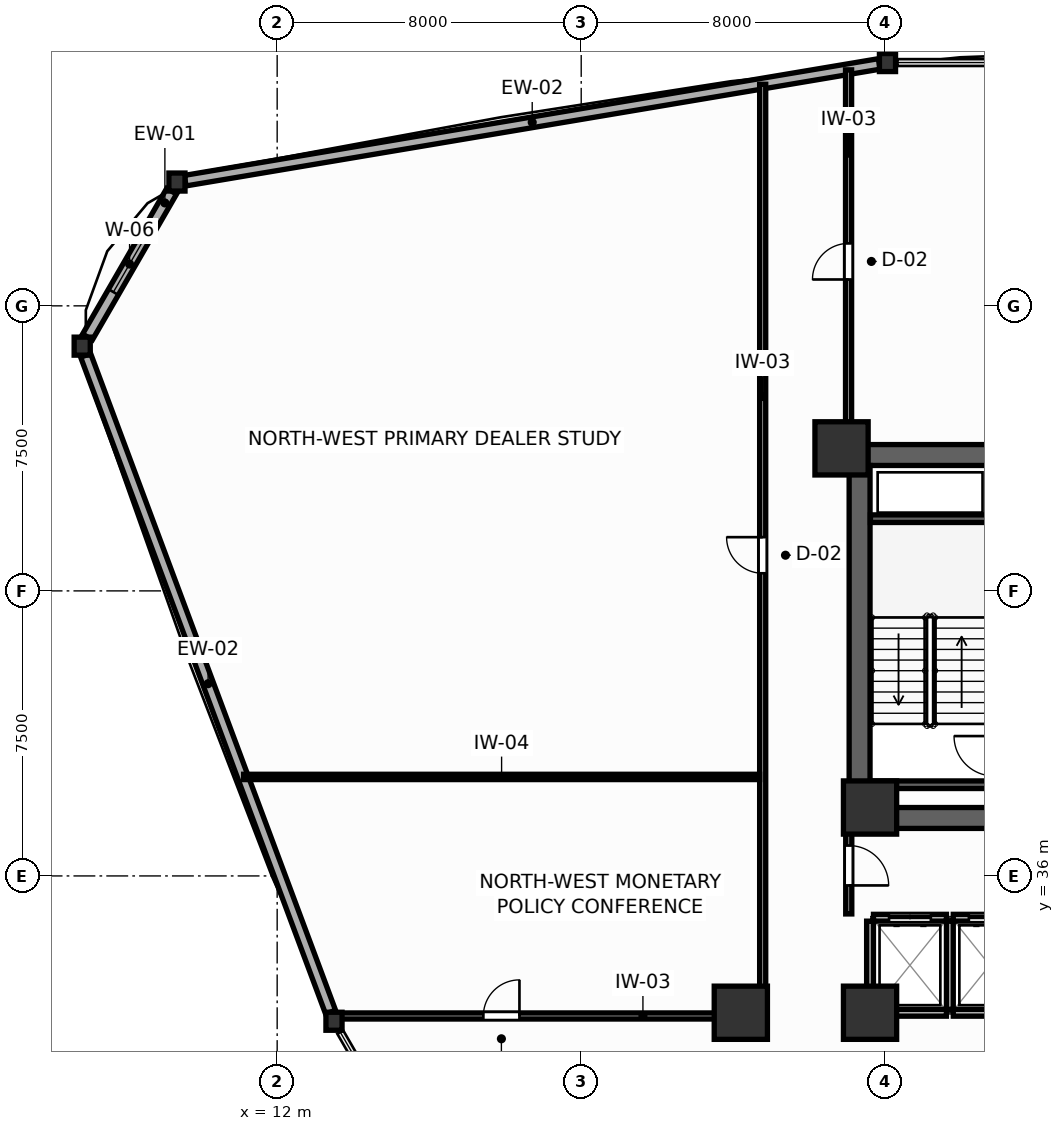
"""IFC4 building model, lengths in metres.
Left out: names, types, materials, properties, quantities, classifications, styles, units other than length and angle.
Written with IfcOpenShell. Run it as: python <this file> out.ifc"""

import sys

from ifc_helpers import new_model, si_unit, direction, frame, frame_2d, origin, origin_2d, place, context, subcontext, project, spatial, rectangle, i_section, extrude, source, transform, mapped, element, fill, save


model = new_model("IFC4")
c1 = context("Model", 3, precision=1e-05, world=origin(), true_north=direction((0.0, 1.0)))
c2 = subcontext(c1, "Body", "Model", "MODEL_VIEW")
j1 = project(units=[si_unit("LENGTHUNIT", "METRE"), si_unit("PLANEANGLEUNIT", "RADIAN")], contexts=[c1])
p1 = place(None, origin())
s1 = spatial("IfcSite", under=j1, at=p1, CompositionType="ELEMENT")
p2 = place(p1, origin())
s2 = spatial("IfcBuilding", under=s1, at=p2, CompositionType="ELEMENT")
p3 = place(p2, frame((0.0, 0.0, 35.7)))
s3 = spatial("IfcBuildingStorey", under=s2, at=p3, CompositionType="ELEMENT", Elevation=35.7)
p4 = place(p3, frame((27.05, 47.075, 0.0), z_axis=(0.0, 0.0, 1.0), x_axis=(1.0, 0.0, 0.0)))
e1 = element("IfcWall", 1, at=p4, inside=s3, PredefinedType="SHEAR", context=c2, shape_type="SweptSolid", body=[
    extrude(rectangle(XDim=17.9, YDim=0.55, at=frame_2d((8.95, 0.0))), origin(), (0.0, 0.0, 1.0), 3.9),
])
p5 = place(p3, frame((27.05, 37.525, 0.0), z_axis=(0.0, 0.0, 1.0), x_axis=(1.0, 0.0, 0.0)))
e2 = element("IfcWall", 2, at=p5, inside=s3, PredefinedType="SHEAR", context=c2, shape_type="SweptSolid", body=[
    extrude(rectangle(XDim=17.9, YDim=0.55, at=frame_2d((8.95, 0.0))), origin(), (0.0, 0.0, 1.0), 3.9),
])
p6 = place(p5, frame((4.975, 0.0, 0.0)))
e3 = element("IfcOpeningElement", 3, at=p6, cuts=e2, PredefinedType="OPENING", context=c2, shape_type="SweptSolid", body=[
    extrude(rectangle(XDim=1.05, YDim=2.1, at=frame_2d((0.525, 1.05))), frame((0.0, 0.285, 0.0), z_axis=(0.0, -1.0, 0.0), x_axis=(1.0, 0.0, 0.0)), (0.0, 0.0, 1.0), 0.57),
])
p7 = place(p5, frame((11.875, 0.0, 0.0)))
e4 = element("IfcOpeningElement", 4, at=p7, cuts=e2, PredefinedType="OPENING", context=c2, shape_type="SweptSolid", body=[
    extrude(rectangle(XDim=1.05, YDim=2.1, at=frame_2d((0.525, 1.05))), frame((0.0, 0.285, 0.0), z_axis=(0.0, -1.0, 0.0), x_axis=(1.0, 0.0, 0.0)), (0.0, 0.0, 1.0), 0.57),
])
p8 = place(p3, frame((27.325, 37.8, 0.0), z_axis=(0.0, 0.0, 1.0), x_axis=(0.0, 1.0, 0.0)))
e5 = element("IfcWall", 5, at=p8, inside=s3, PredefinedType="SHEAR", context=c2, shape_type="SweptSolid", body=[
    extrude(rectangle(XDim=9.0, YDim=0.55, at=frame_2d((4.5, 0.0))), origin(), (0.0, 0.0, 1.0), 3.9),
])
m1 = source(origin(), c2, "Body", "SweptSolid", [
    extrude(rectangle(XDim=1.4, YDim=1.4, at=origin_2d()), origin(), (0.0, 0.0, 1.0), 3.9),
])
for number, where, z_axis, x_axis in (
    (6, (26.85, 47.25, 0.0), (0.0, 0.0, 1.0), (1.0, 0.0, 0.0)),
    (7, (27.6, 37.8, 0.0), (0.0, 0.0, 1.0), (1.0, 0.0, 0.0)),
    (8, (27.6, 32.4, 0.0), (0.0, 0.0, 1.0), (1.0, 0.0, 0.0)),
    (9, (24.2, 32.4, 0.0), (0.0, 0.0, 1.0), (1.0, 0.0, 0.0)),
):
    element("IfcColumn", number, at=place(p3, frame(where, z_axis=z_axis, x_axis=x_axis)), inside=s3, PredefinedType="COLUMN", context=c2, shape_type="MappedRepresentation", body=[
        mapped(m1, transform((0.0, 0.0, 0.0), scale=1.0)),
    ])
m2 = source(origin(), c2, "Body", "SweptSolid", [
    extrude(i_section(OverallWidth=0.424, OverallDepth=0.474, WebThickness=0.045, FlangeThickness=0.072, FilletRadius=0.015, at=origin_2d()), origin(), (0.0, 0.0, 1.0), 3.9),
])
for number, where, z_axis, x_axis in (
    (10, (28.059, 57.402, 0.0), (0.0, 0.0, 1.0), (1.0, 0.0, 0.0)),
    (11, (9.363, 54.257, 0.0), (0.0, 0.0, 1.0), (1.0, 0.0, 0.0)),
    (12, (6.87, 49.94, 0.0), (0.0, 0.0, 1.0), (1.0, 0.0, 0.0)),
    (13, (13.495, 32.177, 0.0), (0.0, 0.0, 1.0), (1.0, 0.0, 0.0)),
):
    element("IfcColumn", number, at=place(p3, frame(where, z_axis=z_axis, x_axis=x_axis)), inside=s3, PredefinedType="COLUMN", context=c2, shape_type="MappedRepresentation", body=[
        mapped(m2, transform((0.0, 0.0, 0.0), scale=1.0)),
    ])
p9 = place(p3, frame((27.842, 57.365, 0.0), z_axis=(0.0, 0.0, 1.0), x_axis=(-0.986153073874, -0.165837616025, 0.0)))
e14 = element("IfcWall", 14, at=p9, inside=s3, PredefinedType="SOLIDWALL", context=c2, shape_type="SweptSolid", body=[
    extrude(rectangle(XDim=18.518, YDim=0.28, at=frame_2d((9.259, 0.0))), origin(), (0.0, 0.0, 1.0), 2.08),
])
p10 = place(p3, frame((9.223, 54.015, 0.0), z_axis=(0.0, 0.0, 1.0), x_axis=(-0.499994569991, -0.866028538779, 0.0)))
e15 = element("IfcWall", 15, at=p10, inside=s3, PredefinedType="SOLIDWALL", context=c2, shape_type="SweptSolid", body=[
    extrude(rectangle(XDim=4.427, YDim=0.3, at=frame_2d((2.213, 0.0))), origin(), (0.0, 0.0, 1.0), 2.08),
])
p11 = place(p10, frame((1.363, 0.0, 0.75)))
e16 = element("IfcOpeningElement", 16, at=p11, cuts=e15, PredefinedType="OPENING", context=c2, shape_type="SweptSolid", body=[
    extrude(rectangle(XDim=1.7, YDim=1.15, at=frame_2d((0.85, 0.575))), frame((0.0, 0.16, 0.0), z_axis=(0.0, -1.0, 0.0), x_axis=(1.0, 0.0, 0.0)), (0.0, 0.0, 1.0), 0.32),
])
p12 = place(p3, frame((6.96, 49.698, 0.0), z_axis=(0.0, 0.0, 1.0), x_axis=(0.349439969545, -0.936958754527, 0.0)))
e17 = element("IfcWall", 17, at=p12, inside=s3, PredefinedType="SOLIDWALL", context=c2, shape_type="SweptSolid", body=[
    extrude(rectangle(XDim=18.442, YDim=0.28, at=frame_2d((9.221, 0.0))), origin(), (0.0, 0.0, 1.0), 2.08),
])
for number, where, z_axis, x_axis in (
    (18, (27.61, 45.4, 0.0), (0.0, 0.0, 1.0), (1.0, 0.0, 0.0)),
    (19, (27.61, 38.4, 0.0), (0.0, 0.0, 1.0), (1.0, 0.0, 0.0)),
):
    element("IfcWall", number, at=place(p3, frame(where, z_axis=z_axis, x_axis=x_axis)), inside=s3, PredefinedType="SHEAR", context=c2, shape_type="SweptSolid", body=[
        extrude(rectangle(XDim=3.14, YDim=0.2, at=frame_2d((1.57, 0.0))), origin(), (0.0, 0.0, 1.0), 3.9),
    ])
p13 = place(p3, frame((27.69, 34.9, 0.0), z_axis=(0.0, 0.0, 1.0), x_axis=(1.0, 0.0, 0.0)))
e20 = element("IfcWall", 20, at=p13, inside=s3, PredefinedType="PARTITIONING", context=c2, shape_type="SweptSolid", body=[
    extrude(rectangle(XDim=1.92, YDim=0.18, at=frame_2d((0.96, 0.0))), origin(), (0.0, 0.0, 1.0), 3.68),
])
p14 = place(p13, frame((0.41, 0.0, 0.0)))
e21 = element("IfcOpeningElement", 21, at=p14, cuts=e20, PredefinedType="OPENING", context=c2, shape_type="SweptSolid", body=[
    extrude(rectangle(XDim=1.1, YDim=2.1, at=frame_2d((0.55, 1.05))), frame((0.0, 0.1, 0.0), z_axis=(0.0, -1.0, 0.0), x_axis=(1.0, 0.0, 0.0)), (0.0, 0.0, 1.0), 0.2),
])
p15 = place(p3, frame((27.69, 32.4, 0.0), z_axis=(0.0, 0.0, 1.0), x_axis=(1.0, 0.0, 0.0)))
e22 = element("IfcWall", 22, at=p15, inside=s3, PredefinedType="PARTITIONING", context=c2, shape_type="SweptSolid", body=[
    extrude(rectangle(XDim=1.92, YDim=0.18, at=frame_2d((0.96, 0.0))), origin(), (0.0, 0.0, 1.0), 2.24),
])
p16 = place(p3, frame((27.6, 32.49, 0.0), z_axis=(0.0, 0.0, 1.0), x_axis=(0.0, 1.0, 0.0)))
e23 = element("IfcWall", 23, at=p16, inside=s3, PredefinedType="PARTITIONING", context=c2, shape_type="SweptSolid", body=[
    extrude(rectangle(XDim=2.32, YDim=0.18, at=frame_2d((1.16, 0.0))), origin(), (0.0, 0.0, 1.0), 3.68),
])
p17 = place(p3, frame((29.79, 34.9, 0.0), z_axis=(0.0, 0.0, 1.0), x_axis=(1.0, 0.0, 0.0)))
e24 = element("IfcWall", 24, at=p17, inside=s3, PredefinedType="PARTITIONING", context=c2, shape_type="SweptSolid", body=[
    extrude(rectangle(XDim=1.92, YDim=0.18, at=frame_2d((0.96, 0.0))), origin(), (0.0, 0.0, 1.0), 3.68),
])
p18 = place(p17, frame((0.41, 0.0, 0.0)))
e25 = element("IfcOpeningElement", 25, at=p18, cuts=e24, PredefinedType="OPENING", context=c2, shape_type="SweptSolid", body=[
    extrude(rectangle(XDim=1.1, YDim=2.1, at=frame_2d((0.55, 1.05))), frame((0.0, 0.1, 0.0), z_axis=(0.0, -1.0, 0.0), x_axis=(1.0, 0.0, 0.0)), (0.0, 0.0, 1.0), 0.2),
])
p19 = place(p3, frame((29.79, 32.4, 0.0), z_axis=(0.0, 0.0, 1.0), x_axis=(1.0, 0.0, 0.0)))
e26 = element("IfcWall", 26, at=p19, inside=s3, PredefinedType="PARTITIONING", context=c2, shape_type="SweptSolid", body=[
    extrude(rectangle(XDim=1.92, YDim=0.18, at=frame_2d((0.96, 0.0))), origin(), (0.0, 0.0, 1.0), 2.24),
])
p20 = place(p3, frame((29.7, 32.49, 0.0), z_axis=(0.0, 0.0, 1.0), x_axis=(0.0, 1.0, 0.0)))
e27 = element("IfcWall", 27, at=p20, inside=s3, PredefinedType="PARTITIONING", context=c2, shape_type="SweptSolid", body=[
    extrude(rectangle(XDim=2.32, YDim=0.18, at=frame_2d((1.16, 0.0))), origin(), (0.0, 0.0, 1.0), 3.68),
])
p21 = place(p3, frame((27.04, 35.0, 0.0), z_axis=(0.0, 0.0, 1.0), x_axis=(0.0, 1.0, 0.0)))
e28 = element("IfcWall", 28, at=p21, inside=s3, PredefinedType="PARTITIONING", context=c2, shape_type="SweptSolid", body=[
    extrude(rectangle(XDim=2.65, YDim=0.16, at=frame_2d((1.325, 0.0))), origin(), (0.0, 0.0, 1.0), 3.68),
])
p22 = place(p21, frame((0.75, 0.0, 0.0)))
e29 = element("IfcOpeningElement", 29, at=p22, cuts=e28, PredefinedType="OPENING", context=c2, shape_type="SweptSolid", body=[
    extrude(rectangle(XDim=1.05, YDim=2.1, at=frame_2d((0.525, 1.05))), frame((0.0, 0.09, 0.0), z_axis=(0.0, -1.0, 0.0), x_axis=(1.0, 0.0, 0.0)), (0.0, 0.0, 1.0), 0.18),
])
p23 = place(p3, frame((24.775, 32.31, 0.0), z_axis=(0.0, 0.0, 1.0), x_axis=(0.0, 1.0, 0.0)))
e30 = element("IfcWall", 30, at=p23, inside=s3, PredefinedType="PARTITIONING", context=c2, shape_type="SweptSolid", body=[
    extrude(rectangle(XDim=24.519, YDim=0.16, at=frame_2d((12.26, 0.0))), origin(), (0.0, 0.0, 1.0), 3.68),
])
p24 = place(p23, frame((11.654, 0.0, 0.0)))
e31 = element("IfcOpeningElement", 31, at=p24, cuts=e30, PredefinedType="OPENING", context=c2, shape_type="SweptSolid", body=[
    extrude(rectangle(XDim=0.95, YDim=2.05, at=frame_2d((0.475, 1.025))), frame((0.0, 0.09, 0.0), z_axis=(0.0, -1.0, 0.0), x_axis=(1.0, 0.0, 0.0)), (0.0, 0.0, 1.0), 0.18),
])
p25 = place(p3, frame((13.463, 32.315, 0.0), z_axis=(0.0, 0.0, 1.0), x_axis=(1.0, 0.0, 0.0)))
e32 = element("IfcWall", 32, at=p25, inside=s3, PredefinedType="PARTITIONING", context=c2, shape_type="SweptSolid", body=[
    extrude(rectangle(XDim=11.23, YDim=0.16, at=frame_2d((5.615, 0.0))), origin(), (0.0, 0.0, 1.0), 2.24),
])
p26 = place(p25, frame((3.962, 0.0, 0.0)))
e33 = element("IfcOpeningElement", 33, at=p26, cuts=e32, PredefinedType="OPENING", context=c2, shape_type="SweptSolid", body=[
    extrude(rectangle(XDim=0.95, YDim=2.05, at=frame_2d((0.475, 1.025))), frame((0.0, 0.09, 0.0), z_axis=(0.0, -1.0, 0.0), x_axis=(1.0, 0.0, 0.0)), (0.0, 0.0, 1.0), 0.18),
])
p27 = place(p3, frame((27.035, 47.34, 0.0), z_axis=(0.0, 0.0, 1.0), x_axis=(0.0, 1.0, 0.0)))
e34 = element("IfcWall", 34, at=p27, inside=s3, PredefinedType="PARTITIONING", context=c2, shape_type="SweptSolid", body=[
    extrude(rectangle(XDim=9.869, YDim=0.16, at=frame_2d((4.935, 0.0))), origin(), (0.0, 0.0, 1.0), 2.24),
])
p28 = place(p27, frame((4.354, 0.0, 0.0)))
e35 = element("IfcOpeningElement", 35, at=p28, cuts=e34, PredefinedType="OPENING", context=c2, shape_type="SweptSolid", body=[
    extrude(rectangle(XDim=0.95, YDim=2.05, at=frame_2d((0.475, 1.025))), frame((0.0, 0.09, 0.0), z_axis=(0.0, -1.0, 0.0), x_axis=(1.0, 0.0, 0.0)), (0.0, 0.0, 1.0), 0.18),
])
p29 = place(p3, frame((11.118, 38.605, 0.0), z_axis=(0.0, 0.0, 1.0), x_axis=(1.0, 0.0, 0.0)))
e36 = element("IfcWall", 36, at=p29, inside=s3, PredefinedType="PARTITIONING", context=c2, shape_type="SweptSolid", body=[
    extrude(rectangle(XDim=13.575, YDim=0.14, at=frame_2d((6.788, 0.0))), origin(), (0.0, 0.0, 1.0), 3.68),
])
p30 = place(p11, origin())
e37 = element("IfcWindow", 37, at=p30, inside=s3, PartitioningType="SINGLE_PANEL", PredefinedType="WINDOW", context=c2, shape_type="SweptSolid", body=[
    extrude(rectangle(XDim=1.7, YDim=1.15, at=frame_2d((0.85, 0.575))), frame((0.0, 0.03, 0.0), z_axis=(0.0, -1.0, 0.0), x_axis=(1.0, 0.0, 0.0)), (0.0, 0.0, 1.0), 0.06),
])
fill(e16, e37)
p31 = place(p14, origin())
e38 = element("IfcDoor", 38, at=p31, inside=s3, OperationType="DOUBLE_DOOR_SLIDING", PredefinedType="DOOR", context=c2, shape_type="SweptSolid", body=[
    extrude(rectangle(XDim=1.1, YDim=2.1, at=frame_2d((0.55, 1.05))), frame((0.0, 0.025, 0.0), z_axis=(0.0, -1.0, 0.0), x_axis=(1.0, 0.0, 0.0)), (0.0, 0.0, 1.0), 0.05),
])
fill(e21, e38)
p32 = place(p18, origin())
e39 = element("IfcDoor", 39, at=p32, inside=s3, OperationType="DOUBLE_DOOR_SLIDING", PredefinedType="DOOR", context=c2, shape_type="SweptSolid", body=[
    extrude(rectangle(XDim=1.1, YDim=2.1, at=frame_2d((0.55, 1.05))), frame((0.0, 0.025, 0.0), z_axis=(0.0, -1.0, 0.0), x_axis=(1.0, 0.0, 0.0)), (0.0, 0.0, 1.0), 0.05),
])
fill(e25, e39)
p33 = place(p22, frame((1.05, 0.0, 0.0), z_axis=(0.0, 0.0, 1.0), x_axis=(-1.0, 0.0, 0.0)))
e40 = element("IfcDoor", 40, at=p33, inside=s3, OperationType="SINGLE_SWING_RIGHT", PredefinedType="DOOR", context=c2, shape_type="SweptSolid", body=[
    extrude(rectangle(XDim=1.05, YDim=2.1, at=frame_2d((0.525, 1.05))), frame((0.0, 0.025, 0.0), z_axis=(0.0, -1.0, 0.0), x_axis=(1.0, 0.0, 0.0)), (0.0, 0.0, 1.0), 0.05),
])
fill(e29, e40)
p34 = place(p24, origin())
e41 = element("IfcDoor", 41, at=p34, inside=s3, OperationType="SINGLE_SWING_RIGHT", PredefinedType="DOOR", context=c2, shape_type="SweptSolid", body=[
    extrude(rectangle(XDim=0.95, YDim=2.05, at=frame_2d((0.475, 1.025))), frame((0.0, 0.025, 0.0), z_axis=(0.0, -1.0, 0.0), x_axis=(1.0, 0.0, 0.0)), (0.0, 0.0, 1.0), 0.05),
])
fill(e31, e41)
p35 = place(p26, origin())
e42 = element("IfcDoor", 42, at=p35, inside=s3, OperationType="SINGLE_SWING_RIGHT", PredefinedType="DOOR", context=c2, shape_type="SweptSolid", body=[
    extrude(rectangle(XDim=0.95, YDim=2.05, at=frame_2d((0.475, 1.025))), frame((0.0, 0.025, 0.0), z_axis=(0.0, -1.0, 0.0), x_axis=(1.0, 0.0, 0.0)), (0.0, 0.0, 1.0), 0.05),
])
fill(e33, e42)
p36 = place(p28, origin())
e43 = element("IfcDoor", 43, at=p36, inside=s3, OperationType="SINGLE_SWING_LEFT", PredefinedType="DOOR", context=c2, shape_type="SweptSolid", body=[
    extrude(rectangle(XDim=0.95, YDim=2.05, at=frame_2d((0.475, 1.025))), frame((0.0, 0.025, 0.0), z_axis=(0.0, -1.0, 0.0), x_axis=(1.0, 0.0, 0.0)), (0.0, 0.0, 1.0), 0.05),
])
fill(e35, e43)
save(model, sys.argv[1])
